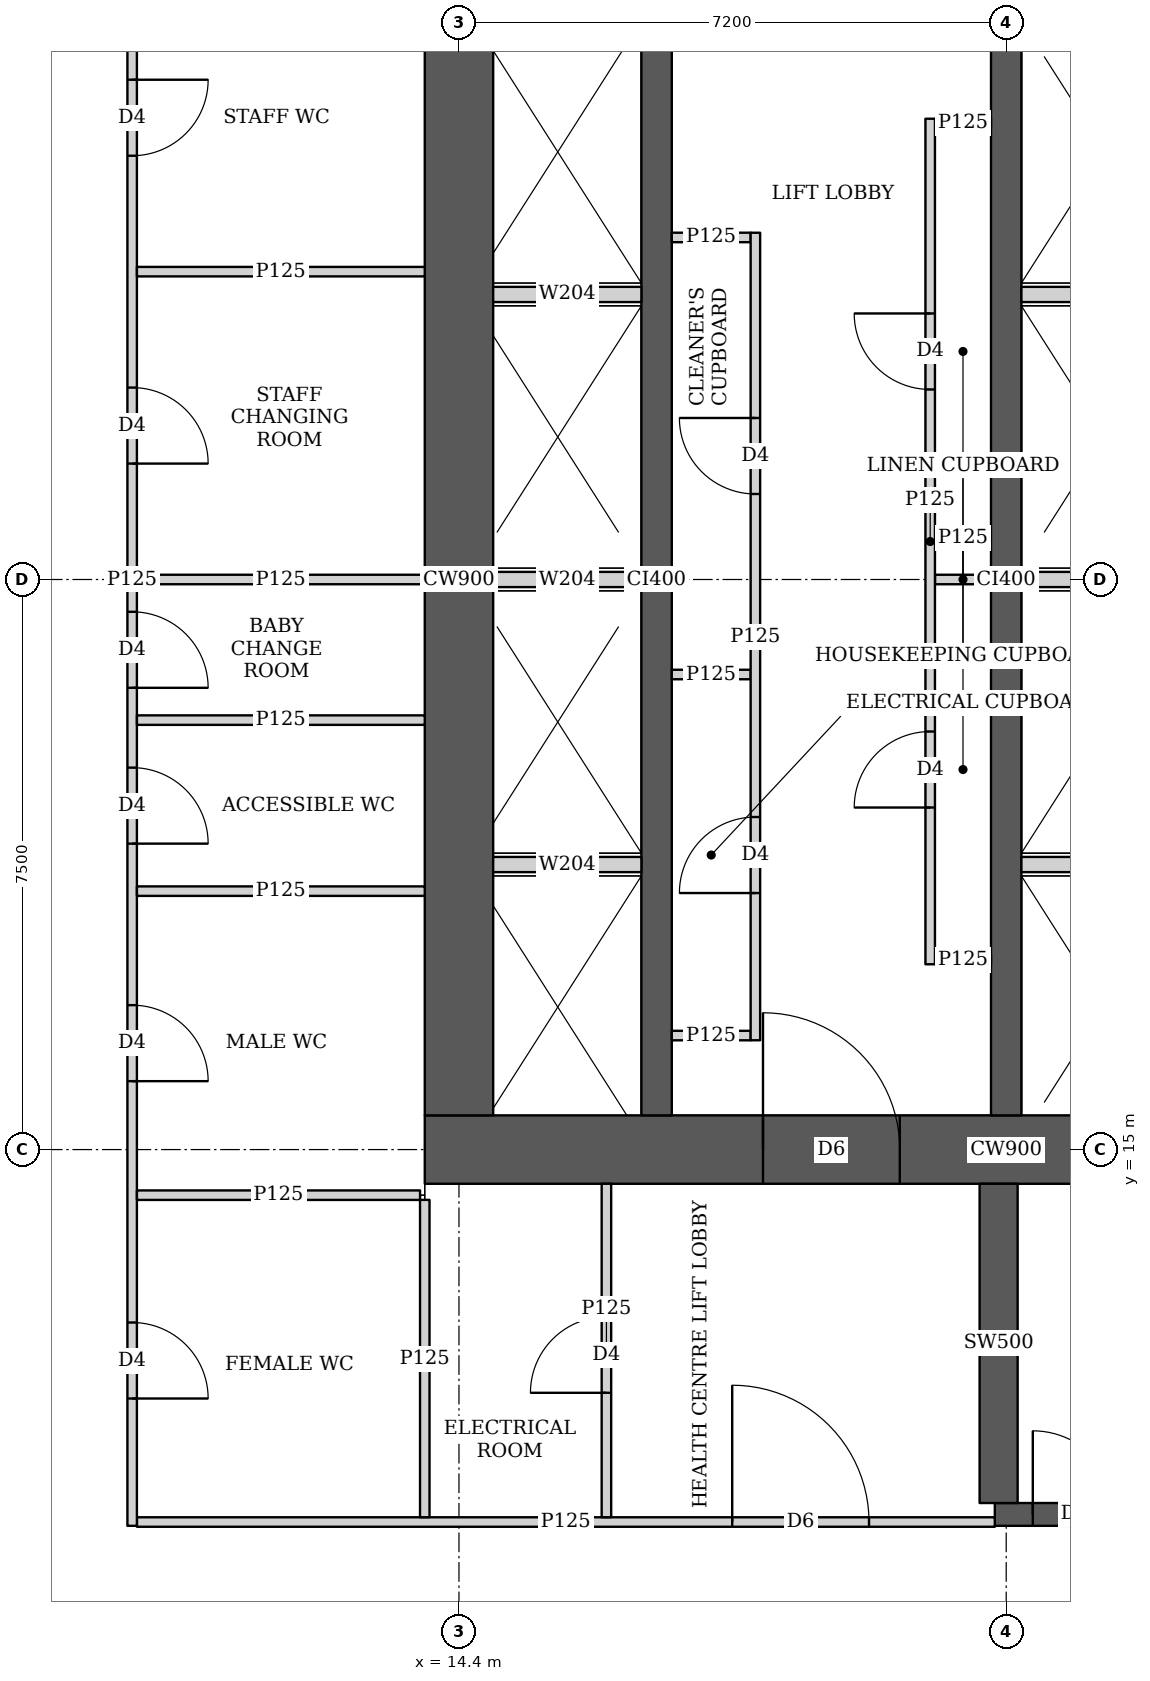
"""IFC4 building model, lengths in metres.
Left out: names, types, materials, properties, quantities, classifications, styles, units other than length and angle.
Written with IfcOpenShell. Run it as: python <this file> out.ifc"""

import sys

from ifc_helpers import new_model, si_unit, direction, frame, frame_2d, origin, place, context, subcontext, project, spatial, rectangle, extrude, element, fill, save


model = new_model("IFC4")
c1 = context("Model", 3, precision=1e-05, world=origin(), true_north=direction((0.0, 1.0)))
c2 = subcontext(c1, "Body", "Model", "MODEL_VIEW")
j1 = project(units=[si_unit("LENGTHUNIT", "METRE"), si_unit("PLANEANGLEUNIT", "RADIAN")], contexts=[c1])
p1 = place(None, origin())
s1 = spatial("IfcSite", under=j1, at=p1, CompositionType="ELEMENT")
p2 = place(p1, origin())
s2 = spatial("IfcBuilding", under=s1, at=p2, CompositionType="ELEMENT")
p3 = place(p2, frame((0.0, 0.0, 10.1)))
s3 = spatial("IfcBuildingStorey", under=s2, at=p3, CompositionType="ELEMENT", Elevation=10.1)
p4 = place(p3, frame((13.95, 15.0, 0.0), z_axis=(0.0, 0.0, 1.0), x_axis=(1.0, 0.0, 0.0)))
e1 = element("IfcWall", 1, at=p4, inside=s3, PredefinedType="SHEAR", context=c2, shape_type="SweptSolid", body=[
    extrude(rectangle(XDim=15.3, YDim=0.9, at=frame_2d((7.65, 0.0))), origin(), (0.0, 0.0, 1.0), 4.5),
])
p5 = place(p4, frame((4.45, 0.0, 0.0)))
e2 = element("IfcOpeningElement", 2, at=p5, cuts=e1, PredefinedType="OPENING", context=c2, shape_type="SweptSolid", body=[
    extrude(rectangle(XDim=1.8, YDim=2.1, at=frame_2d((0.9, 1.05))), frame((0.0, 0.46, 0.0), z_axis=(0.0, -1.0, 0.0), x_axis=(1.0, 0.0, 0.0)), (0.0, 0.0, 1.0), 0.92),
])
p6 = place(p4, frame((10.7, 0.0, 0.0)))
e3 = element("IfcOpeningElement", 3, at=p6, cuts=e1, PredefinedType="OPENING", context=c2, shape_type="SweptSolid", body=[
    extrude(rectangle(XDim=1.1, YDim=2.1, at=frame_2d((0.55, 1.05))), frame((0.0, 0.46, 0.0), z_axis=(0.0, -1.0, 0.0), x_axis=(1.0, 0.0, 0.0)), (0.0, 0.0, 1.0), 0.92),
])
p7 = place(p3, frame((14.4, 15.45, 0.0), z_axis=(0.0, 0.0, 1.0), x_axis=(0.0, 1.0, 0.0)))
e4 = element("IfcWall", 4, at=p7, inside=s3, PredefinedType="SHEAR", context=c2, shape_type="SweptSolid", body=[
    extrude(rectangle(XDim=14.1, YDim=0.9, at=frame_2d((7.05, 0.0))), origin(), (0.0, 0.0, 1.0), 4.5),
])
for number, where, z_axis, x_axis in (
    (5, (17.0, 15.45, 0.0), (0.0, 0.0, 1.0), (0.0, 1.0, 0.0)),
    (6, (21.6, 15.45, 0.0), (0.0, 0.0, 1.0), (0.0, 1.0, 0.0)),
):
    element("IfcWall", number, at=place(p3, frame(where, z_axis=z_axis, x_axis=x_axis)), inside=s3, PredefinedType="SHEAR", context=c2, shape_type="SweptSolid", body=[
        extrude(rectangle(XDim=14.1, YDim=0.4, at=frame_2d((7.05, 0.0))), origin(), (0.0, 0.0, 1.0), 4.5),
    ])
p8 = place(p3, frame((21.45, 10.2, 0.0), z_axis=(0.0, 0.0, 1.0), x_axis=(1.0, 0.0, 0.0)))
e7 = element("IfcWall", 7, at=p8, inside=s3, PredefinedType="SHEAR", context=c2, shape_type="SweptSolid", body=[
    extrude(rectangle(XDim=7.5, YDim=0.3, at=frame_2d((3.75, 0.0))), origin(), (0.0, 0.0, 1.0), 4.5),
])
p9 = place(p8, frame((0.5, 0.0, 0.0)))
e8 = element("IfcOpeningElement", 8, at=p9, cuts=e7, PredefinedType="OPENING", context=c2, shape_type="SweptSolid", body=[
    extrude(rectangle(XDim=1.1, YDim=2.1, at=frame_2d((0.55, 1.05))), frame((0.0, 0.16, 0.0), z_axis=(0.0, -1.0, 0.0), x_axis=(1.0, 0.0, 0.0)), (0.0, 0.0, 1.0), 0.32),
])
p10 = place(p3, frame((21.5, 10.35, 0.0), z_axis=(0.0, 0.0, 1.0), x_axis=(0.0, 1.0, 0.0)))
e9 = element("IfcWall", 9, at=p10, inside=s3, PredefinedType="SHEAR", context=c2, shape_type="SweptSolid", body=[
    extrude(rectangle(XDim=4.2, YDim=0.5, at=frame_2d((2.1, 0.0))), origin(), (0.0, 0.0, 1.0), 4.5),
])
p11 = place(p3, frame((10.1, 10.05, 0.0), z_axis=(0.0, 0.0, 1.0), x_axis=(0.0, 1.0, 0.0)))
e10 = element("IfcWall", 10, at=p11, inside=s3, PredefinedType="PARTITIONING", context=c2, shape_type="SweptSolid", body=[
    extrude(rectangle(XDim=24.9, YDim=0.125, at=frame_2d((12.45, 0.0))), origin(), (0.0, 0.0, 1.0), 2.6),
])
p12 = place(p11, frame((1.675, 0.0, 0.0)))
e11 = element("IfcOpeningElement", 11, at=p12, cuts=e10, PredefinedType="OPENING", context=c2, shape_type="SweptSolid", body=[
    extrude(rectangle(XDim=1.0, YDim=2.1, at=frame_2d((0.5, 1.05))), frame((0.0, 0.073, 0.0), z_axis=(0.0, -1.0, 0.0), x_axis=(1.0, 0.0, 0.0)), (0.0, 0.0, 1.0), 0.145),
])
p13 = place(p11, frame((5.85, 0.0, 0.0)))
e12 = element("IfcOpeningElement", 12, at=p13, cuts=e10, PredefinedType="OPENING", context=c2, shape_type="SweptSolid", body=[
    extrude(rectangle(XDim=1.0, YDim=2.1, at=frame_2d((0.5, 1.05))), frame((0.0, 0.073, 0.0), z_axis=(0.0, -1.0, 0.0), x_axis=(1.0, 0.0, 0.0)), (0.0, 0.0, 1.0), 0.145),
])
p14 = place(p11, frame((8.975, 0.0, 0.0)))
e13 = element("IfcOpeningElement", 13, at=p14, cuts=e10, PredefinedType="OPENING", context=c2, shape_type="SweptSolid", body=[
    extrude(rectangle(XDim=1.0, YDim=2.1, at=frame_2d((0.5, 1.05))), frame((0.0, 0.073, 0.0), z_axis=(0.0, -1.0, 0.0), x_axis=(1.0, 0.0, 0.0)), (0.0, 0.0, 1.0), 0.145),
])
p15 = place(p11, frame((11.025, 0.0, 0.0)))
e14 = element("IfcOpeningElement", 14, at=p15, cuts=e10, PredefinedType="OPENING", context=c2, shape_type="SweptSolid", body=[
    extrude(rectangle(XDim=1.0, YDim=2.1, at=frame_2d((0.5, 1.05))), frame((0.0, 0.073, 0.0), z_axis=(0.0, -1.0, 0.0), x_axis=(1.0, 0.0, 0.0)), (0.0, 0.0, 1.0), 0.145),
])
p16 = place(p11, frame((13.975, 0.0, 0.0)))
e15 = element("IfcOpeningElement", 15, at=p16, cuts=e10, PredefinedType="OPENING", context=c2, shape_type="SweptSolid", body=[
    extrude(rectangle(XDim=1.0, YDim=2.1, at=frame_2d((0.5, 1.05))), frame((0.0, 0.073, 0.0), z_axis=(0.0, -1.0, 0.0), x_axis=(1.0, 0.0, 0.0)), (0.0, 0.0, 1.0), 0.145),
])
p17 = place(p11, frame((18.025, 0.0, 0.0)))
e16 = element("IfcOpeningElement", 16, at=p17, cuts=e10, PredefinedType="OPENING", context=c2, shape_type="SweptSolid", body=[
    extrude(rectangle(XDim=1.0, YDim=2.1, at=frame_2d((0.5, 1.05))), frame((0.0, 0.073, 0.0), z_axis=(0.0, -1.0, 0.0), x_axis=(1.0, 0.0, 0.0)), (0.0, 0.0, 1.0), 0.145),
])
p18 = place(p11, frame((21.05, 0.0, 0.0)))
e17 = element("IfcOpeningElement", 17, at=p18, cuts=e10, PredefinedType="OPENING", context=c2, shape_type="SweptSolid", body=[
    extrude(rectangle(XDim=1.0, YDim=2.1, at=frame_2d((0.5, 1.05))), frame((0.0, 0.073, 0.0), z_axis=(0.0, -1.0, 0.0), x_axis=(1.0, 0.0, 0.0)), (0.0, 0.0, 1.0), 0.145),
])
p19 = place(p11, frame((23.225, 0.0, 0.0)))
e18 = element("IfcOpeningElement", 18, at=p19, cuts=e10, PredefinedType="OPENING", context=c2, shape_type="SweptSolid", body=[
    extrude(rectangle(XDim=1.0, YDim=2.1, at=frame_2d((0.5, 1.05))), frame((0.0, 0.073, 0.0), z_axis=(0.0, -1.0, 0.0), x_axis=(1.0, 0.0, 0.0)), (0.0, 0.0, 1.0), 0.145),
])
p20 = place(p3, frame((10.163, 14.4, 0.0), z_axis=(0.0, 0.0, 1.0), x_axis=(1.0, 0.0, 0.0)))
e19 = element("IfcWall", 19, at=p20, inside=s3, PredefinedType="PARTITIONING", context=c2, shape_type="SweptSolid", body=[
    extrude(rectangle(XDim=3.725, YDim=0.125, at=frame_2d((1.862, 0.0))), origin(), (0.0, 0.0, 1.0), 2.6),
])
p21 = place(p3, frame((10.163, 22.5, 0.0), z_axis=(0.0, 0.0, 1.0), x_axis=(1.0, 0.0, 0.0)))
e20 = element("IfcWall", 20, at=p21, inside=s3, PredefinedType="PARTITIONING", context=c2, shape_type="SweptSolid", body=[
    extrude(rectangle(XDim=3.787, YDim=0.125, at=frame_2d((1.894, 0.0))), origin(), (0.0, 0.0, 1.0), 2.6),
])
p22 = place(p3, frame((13.95, 10.163, 0.0), z_axis=(0.0, 0.0, 1.0), x_axis=(0.0, 1.0, 0.0)))
e21 = element("IfcWall", 21, at=p22, inside=s3, PredefinedType="PARTITIONING", context=c2, shape_type="SweptSolid", body=[
    extrude(rectangle(XDim=4.175, YDim=0.125, at=frame_2d((2.087, 0.0))), origin(), (0.0, 0.0, 1.0), 2.6),
])
p23 = place(p3, frame((10.163, 10.1, 0.0), z_axis=(0.0, 0.0, 1.0), x_axis=(1.0, 0.0, 0.0)))
e22 = element("IfcWall", 22, at=p23, inside=s3, PredefinedType="PARTITIONING", context=c2, shape_type="SweptSolid", body=[
    extrude(rectangle(XDim=11.287, YDim=0.125, at=frame_2d((5.644, 0.0))), origin(), (0.0, 0.0, 1.0), 2.2),
])
p24 = place(p23, frame((7.832, 0.0, 0.0)))
e23 = element("IfcOpeningElement", 23, at=p24, cuts=e22, PredefinedType="OPENING", context=c2, shape_type="SweptSolid", body=[
    extrude(rectangle(XDim=1.8, YDim=2.1, at=frame_2d((0.9, 1.05))), frame((0.0, 0.073, 0.0), z_axis=(0.0, -1.0, 0.0), x_axis=(1.0, 0.0, 0.0)), (0.0, 0.0, 1.0), 0.145),
])
p25 = place(p3, frame((16.34, 10.163, 0.0), z_axis=(0.0, 0.0, 1.0), x_axis=(0.0, 1.0, 0.0)))
e24 = element("IfcWall", 24, at=p25, inside=s3, PredefinedType="PARTITIONING", context=c2, shape_type="SweptSolid", body=[
    extrude(rectangle(XDim=4.387, YDim=0.125, at=frame_2d((2.193, 0.0))), origin(), (0.0, 0.0, 1.0), 4.2),
])
p26 = place(p25, frame((1.637, 0.0, 0.0)))
e25 = element("IfcOpeningElement", 25, at=p26, cuts=e24, PredefinedType="OPENING", context=c2, shape_type="SweptSolid", body=[
    extrude(rectangle(XDim=1.0, YDim=2.1, at=frame_2d((0.5, 1.05))), frame((0.0, 0.073, 0.0), z_axis=(0.0, -1.0, 0.0), x_axis=(1.0, 0.0, 0.0)), (0.0, 0.0, 1.0), 0.145),
])
for number, where, z_axis, x_axis in (
    (26, (10.163, 18.4, 0.0), (0.0, 0.0, 1.0), (1.0, 0.0, 0.0)),
    (27, (10.163, 20.65, 0.0), (0.0, 0.0, 1.0), (1.0, 0.0, 0.0)),
    (28, (10.163, 26.55, 0.0), (0.0, 0.0, 1.0), (1.0, 0.0, 0.0)),
):
    element("IfcWall", number, at=place(p3, frame(where, z_axis=z_axis, x_axis=x_axis)), inside=s3, PredefinedType="PARTITIONING", context=c2, shape_type="SweptSolid", body=[
        extrude(rectangle(XDim=3.787, YDim=0.125, at=frame_2d((1.894, 0.0))), origin(), (0.0, 0.0, 1.0), 4.2),
    ])
p27 = place(p3, frame((20.6, 17.438, 0.0), z_axis=(0.0, 0.0, 1.0), x_axis=(0.0, 1.0, 0.0)))
e29 = element("IfcWall", 29, at=p27, inside=s3, PredefinedType="PARTITIONING", context=c2, shape_type="SweptSolid", body=[
    extrude(rectangle(XDim=11.124, YDim=0.125, at=frame_2d((5.562, 0.0))), origin(), (0.0, 0.0, 1.0), 4.2),
])
p28 = place(p27, frame((2.062, 0.0, 0.0)))
e30 = element("IfcOpeningElement", 30, at=p28, cuts=e29, PredefinedType="OPENING", context=c2, shape_type="SweptSolid", body=[
    extrude(rectangle(XDim=1.0, YDim=2.1, at=frame_2d((0.5, 1.05))), frame((0.0, 0.073, 0.0), z_axis=(0.0, -1.0, 0.0), x_axis=(1.0, 0.0, 0.0)), (0.0, 0.0, 1.0), 0.145),
])
p29 = place(p27, frame((7.562, 0.0, 0.0)))
e31 = element("IfcOpeningElement", 31, at=p29, cuts=e29, PredefinedType="OPENING", context=c2, shape_type="SweptSolid", body=[
    extrude(rectangle(XDim=1.0, YDim=2.1, at=frame_2d((0.5, 1.05))), frame((0.0, 0.073, 0.0), z_axis=(0.0, -1.0, 0.0), x_axis=(1.0, 0.0, 0.0)), (0.0, 0.0, 1.0), 0.145),
])
for number, where, z_axis, x_axis in (
    (32, (20.663, 17.5, 0.0), (0.0, 0.0, 1.0), (1.0, 0.0, 0.0)),
    (33, (20.663, 28.5, 0.0), (0.0, 0.0, 1.0), (1.0, 0.0, 0.0)),
    (34, (20.663, 22.5, 0.0), (0.0, 0.0, 1.0), (1.0, 0.0, 0.0)),
):
    element("IfcWall", number, at=place(p3, frame(where, z_axis=z_axis, x_axis=x_axis)), inside=s3, PredefinedType="PARTITIONING", context=c2, shape_type="SweptSolid", body=[
        extrude(rectangle(XDim=0.737, YDim=0.125, at=frame_2d((0.368, 0.0))), origin(), (0.0, 0.0, 1.0), 4.2),
    ])
p30 = place(p3, frame((18.3, 27.062, 0.0), z_axis=(0.0, 0.0, 1.0), x_axis=(0.0, -1.0, 0.0)))
e35 = element("IfcWall", 35, at=p30, inside=s3, PredefinedType="PARTITIONING", context=c2, shape_type="SweptSolid", body=[
    extrude(rectangle(XDim=10.624, YDim=0.125, at=frame_2d((5.312, 0.0))), origin(), (0.0, 0.0, 1.0), 4.2),
])
p31 = place(p30, frame((7.687, 0.0, 0.0)))
e36 = element("IfcOpeningElement", 36, at=p31, cuts=e35, PredefinedType="OPENING", context=c2, shape_type="SweptSolid", body=[
    extrude(rectangle(XDim=1.0, YDim=2.1, at=frame_2d((0.5, 1.05))), frame((0.0, 0.073, 0.0), z_axis=(0.0, -1.0, 0.0), x_axis=(1.0, 0.0, 0.0)), (0.0, 0.0, 1.0), 0.145),
])
p32 = place(p30, frame((2.437, 0.0, 0.0)))
e37 = element("IfcOpeningElement", 37, at=p32, cuts=e35, PredefinedType="OPENING", context=c2, shape_type="SweptSolid", body=[
    extrude(rectangle(XDim=1.0, YDim=2.1, at=frame_2d((0.5, 1.05))), frame((0.0, 0.073, 0.0), z_axis=(0.0, -1.0, 0.0), x_axis=(1.0, 0.0, 0.0)), (0.0, 0.0, 1.0), 0.145),
])
for number, where, z_axis, x_axis in (
    (38, (17.2, 16.5, 0.0), (0.0, 0.0, 1.0), (1.0, 0.0, 0.0)),
    (39, (17.2, 27.0, 0.0), (0.0, 0.0, 1.0), (1.0, 0.0, 0.0)),
    (40, (17.2, 21.25, 0.0), (0.0, 0.0, 1.0), (1.0, 0.0, 0.0)),
):
    element("IfcWall", number, at=place(p3, frame(where, z_axis=z_axis, x_axis=x_axis)), inside=s3, PredefinedType="PARTITIONING", context=c2, shape_type="SweptSolid", body=[
        extrude(rectangle(XDim=1.038, YDim=0.125, at=frame_2d((0.519, 0.0))), origin(), (0.0, 0.0, 1.0), 4.2),
    ])
p33 = place(p3, frame((14.85, 18.75, 0.0), z_axis=(0.0, 0.0, 1.0), x_axis=(1.0, 0.0, 0.0)))
e41 = element("IfcWall", 41, at=p33, inside=s3, PredefinedType="SOLIDWALL", context=c2, shape_type="SweptSolid", body=[
    extrude(rectangle(XDim=1.95, YDim=0.2, at=frame_2d((0.975, 0.0))), origin(), (0.0, 0.0, 1.0), 4.2),
])
p34 = place(p3, frame((21.8, 18.75, 0.0), z_axis=(0.0, 0.0, 1.0), x_axis=(1.0, 0.0, 0.0)))
e42 = element("IfcWall", 42, at=p34, inside=s3, PredefinedType="SOLIDWALL", context=c2, shape_type="SweptSolid", body=[
    extrude(rectangle(XDim=2.2, YDim=0.2, at=frame_2d((1.1, 0.0))), origin(), (0.0, 0.0, 1.0), 4.2),
])
p35 = place(p3, frame((14.85, 22.5, 0.0), z_axis=(0.0, 0.0, 1.0), x_axis=(1.0, 0.0, 0.0)))
e43 = element("IfcWall", 43, at=p35, inside=s3, PredefinedType="SOLIDWALL", context=c2, shape_type="SweptSolid", body=[
    extrude(rectangle(XDim=1.95, YDim=0.2, at=frame_2d((0.975, 0.0))), origin(), (0.0, 0.0, 1.0), 4.2),
])
p36 = place(p3, frame((21.8, 22.5, 0.0), z_axis=(0.0, 0.0, 1.0), x_axis=(1.0, 0.0, 0.0)))
e44 = element("IfcWall", 44, at=p36, inside=s3, PredefinedType="SOLIDWALL", context=c2, shape_type="SweptSolid", body=[
    extrude(rectangle(XDim=2.2, YDim=0.2, at=frame_2d((1.1, 0.0))), origin(), (0.0, 0.0, 1.0), 4.2),
])
p37 = place(p3, frame((14.85, 26.25, 0.0), z_axis=(0.0, 0.0, 1.0), x_axis=(1.0, 0.0, 0.0)))
e45 = element("IfcWall", 45, at=p37, inside=s3, PredefinedType="SOLIDWALL", context=c2, shape_type="SweptSolid", body=[
    extrude(rectangle(XDim=1.95, YDim=0.2, at=frame_2d((0.975, 0.0))), origin(), (0.0, 0.0, 1.0), 4.2),
])
p38 = place(p3, frame((21.8, 26.25, 0.0), z_axis=(0.0, 0.0, 1.0), x_axis=(1.0, 0.0, 0.0)))
e46 = element("IfcWall", 46, at=p38, inside=s3, PredefinedType="SOLIDWALL", context=c2, shape_type="SweptSolid", body=[
    extrude(rectangle(XDim=2.2, YDim=0.2, at=frame_2d((1.1, 0.0))), origin(), (0.0, 0.0, 1.0), 4.2),
])
p39 = place(p12, origin())
e47 = element("IfcDoor", 47, at=p39, inside=s3, OperationType="SINGLE_SWING_RIGHT", PredefinedType="DOOR", context=c2, shape_type="SweptSolid", body=[
    extrude(rectangle(XDim=1.0, YDim=2.1, at=frame_2d((0.5, 1.05))), frame((0.0, 0.025, 0.0), z_axis=(0.0, -1.0, 0.0), x_axis=(1.0, 0.0, 0.0)), (0.0, 0.0, 1.0), 0.05),
])
fill(e11, e47)
p40 = place(p26, origin())
e48 = element("IfcDoor", 48, at=p40, inside=s3, OperationType="SINGLE_SWING_LEFT", PredefinedType="DOOR", context=c2, shape_type="SweptSolid", body=[
    extrude(rectangle(XDim=1.0, YDim=2.1, at=frame_2d((0.5, 1.05))), frame((0.0, 0.025, 0.0), z_axis=(0.0, -1.0, 0.0), x_axis=(1.0, 0.0, 0.0)), (0.0, 0.0, 1.0), 0.05),
])
fill(e25, e48)
p41 = place(p24, origin())
e49 = element("IfcDoor", 49, at=p41, inside=s3, OperationType="DOUBLE_DOOR_SINGLE_SWING", PredefinedType="DOOR", context=c2, shape_type="SweptSolid", body=[
    extrude(rectangle(XDim=1.8, YDim=2.1, at=frame_2d((0.9, 1.05))), frame((0.0, 0.025, 0.0), z_axis=(0.0, -1.0, 0.0), x_axis=(1.0, 0.0, 0.0)), (0.0, 0.0, 1.0), 0.05),
])
fill(e23, e49)
p42 = place(p13, origin())
e50 = element("IfcDoor", 50, at=p42, inside=s3, OperationType="SINGLE_SWING_RIGHT", PredefinedType="DOOR", context=c2, shape_type="SweptSolid", body=[
    extrude(rectangle(XDim=1.0, YDim=2.1, at=frame_2d((0.5, 1.05))), frame((0.0, 0.025, 0.0), z_axis=(0.0, -1.0, 0.0), x_axis=(1.0, 0.0, 0.0)), (0.0, 0.0, 1.0), 0.05),
])
fill(e12, e50)
p43 = place(p14, origin())
e51 = element("IfcDoor", 51, at=p43, inside=s3, OperationType="SINGLE_SWING_RIGHT", PredefinedType="DOOR", context=c2, shape_type="SweptSolid", body=[
    extrude(rectangle(XDim=1.0, YDim=2.1, at=frame_2d((0.5, 1.05))), frame((0.0, 0.025, 0.0), z_axis=(0.0, -1.0, 0.0), x_axis=(1.0, 0.0, 0.0)), (0.0, 0.0, 1.0), 0.05),
])
fill(e13, e51)
p44 = place(p15, origin())
e52 = element("IfcDoor", 52, at=p44, inside=s3, OperationType="SINGLE_SWING_RIGHT", PredefinedType="DOOR", context=c2, shape_type="SweptSolid", body=[
    extrude(rectangle(XDim=1.0, YDim=2.1, at=frame_2d((0.5, 1.05))), frame((0.0, 0.025, 0.0), z_axis=(0.0, -1.0, 0.0), x_axis=(1.0, 0.0, 0.0)), (0.0, 0.0, 1.0), 0.05),
])
fill(e14, e52)
p45 = place(p16, origin())
e53 = element("IfcDoor", 53, at=p45, inside=s3, OperationType="SINGLE_SWING_RIGHT", PredefinedType="DOOR", context=c2, shape_type="SweptSolid", body=[
    extrude(rectangle(XDim=1.0, YDim=2.1, at=frame_2d((0.5, 1.05))), frame((0.0, 0.025, 0.0), z_axis=(0.0, -1.0, 0.0), x_axis=(1.0, 0.0, 0.0)), (0.0, 0.0, 1.0), 0.05),
])
fill(e15, e53)
p46 = place(p17, origin())
e54 = element("IfcDoor", 54, at=p46, inside=s3, OperationType="SINGLE_SWING_LEFT", PredefinedType="DOOR", context=c2, shape_type="SweptSolid", body=[
    extrude(rectangle(XDim=1.0, YDim=2.1, at=frame_2d((0.5, 1.05))), frame((0.0, 0.025, 0.0), z_axis=(0.0, -1.0, 0.0), x_axis=(1.0, 0.0, 0.0)), (0.0, 0.0, 1.0), 0.05),
])
fill(e16, e54)
p47 = place(p28, origin())
e55 = element("IfcDoor", 55, at=p47, inside=s3, OperationType="SINGLE_SWING_LEFT", PredefinedType="DOOR", context=c2, shape_type="SweptSolid", body=[
    extrude(rectangle(XDim=1.0, YDim=2.1, at=frame_2d((0.5, 1.05))), frame((0.0, 0.025, 0.0), z_axis=(0.0, -1.0, 0.0), x_axis=(1.0, 0.0, 0.0)), (0.0, 0.0, 1.0), 0.05),
])
fill(e30, e55)
p48 = place(p29, origin())
e56 = element("IfcDoor", 56, at=p48, inside=s3, OperationType="SINGLE_SWING_RIGHT", PredefinedType="DOOR", context=c2, shape_type="SweptSolid", body=[
    extrude(rectangle(XDim=1.0, YDim=2.1, at=frame_2d((0.5, 1.05))), frame((0.0, 0.025, 0.0), z_axis=(0.0, -1.0, 0.0), x_axis=(1.0, 0.0, 0.0)), (0.0, 0.0, 1.0), 0.05),
])
fill(e31, e56)
p49 = place(p31, origin())
e57 = element("IfcDoor", 57, at=p49, inside=s3, OperationType="SINGLE_SWING_LEFT", PredefinedType="DOOR", context=c2, shape_type="SweptSolid", body=[
    extrude(rectangle(XDim=1.0, YDim=2.1, at=frame_2d((0.5, 1.05))), frame((0.0, 0.025, 0.0), z_axis=(0.0, -1.0, 0.0), x_axis=(1.0, 0.0, 0.0)), (0.0, 0.0, 1.0), 0.05),
])
fill(e36, e57)
p50 = place(p32, origin())
e58 = element("IfcDoor", 58, at=p50, inside=s3, OperationType="SINGLE_SWING_RIGHT", PredefinedType="DOOR", context=c2, shape_type="SweptSolid", body=[
    extrude(rectangle(XDim=1.0, YDim=2.1, at=frame_2d((0.5, 1.05))), frame((0.0, 0.025, 0.0), z_axis=(0.0, -1.0, 0.0), x_axis=(1.0, 0.0, 0.0)), (0.0, 0.0, 1.0), 0.05),
])
fill(e37, e58)
p51 = place(p5, origin())
e59 = element("IfcDoor", 59, at=p51, inside=s3, OperationType="DOUBLE_DOOR_SINGLE_SWING", PredefinedType="DOOR", context=c2, shape_type="SweptSolid", body=[
    extrude(rectangle(XDim=1.8, YDim=2.1, at=frame_2d((0.9, 1.05))), frame((0.0, 0.025, 0.0), z_axis=(0.0, -1.0, 0.0), x_axis=(1.0, 0.0, 0.0)), (0.0, 0.0, 1.0), 0.05),
])
fill(e2, e59)
p52 = place(p9, origin())
e60 = element("IfcDoor", 60, at=p52, inside=s3, OperationType="SINGLE_SWING_LEFT", PredefinedType="DOOR", context=c2, shape_type="SweptSolid", body=[
    extrude(rectangle(XDim=1.1, YDim=2.1, at=frame_2d((0.55, 1.05))), frame((0.0, 0.025, 0.0), z_axis=(0.0, -1.0, 0.0), x_axis=(1.0, 0.0, 0.0)), (0.0, 0.0, 1.0), 0.05),
])
fill(e8, e60)
save(model, sys.argv[1])
